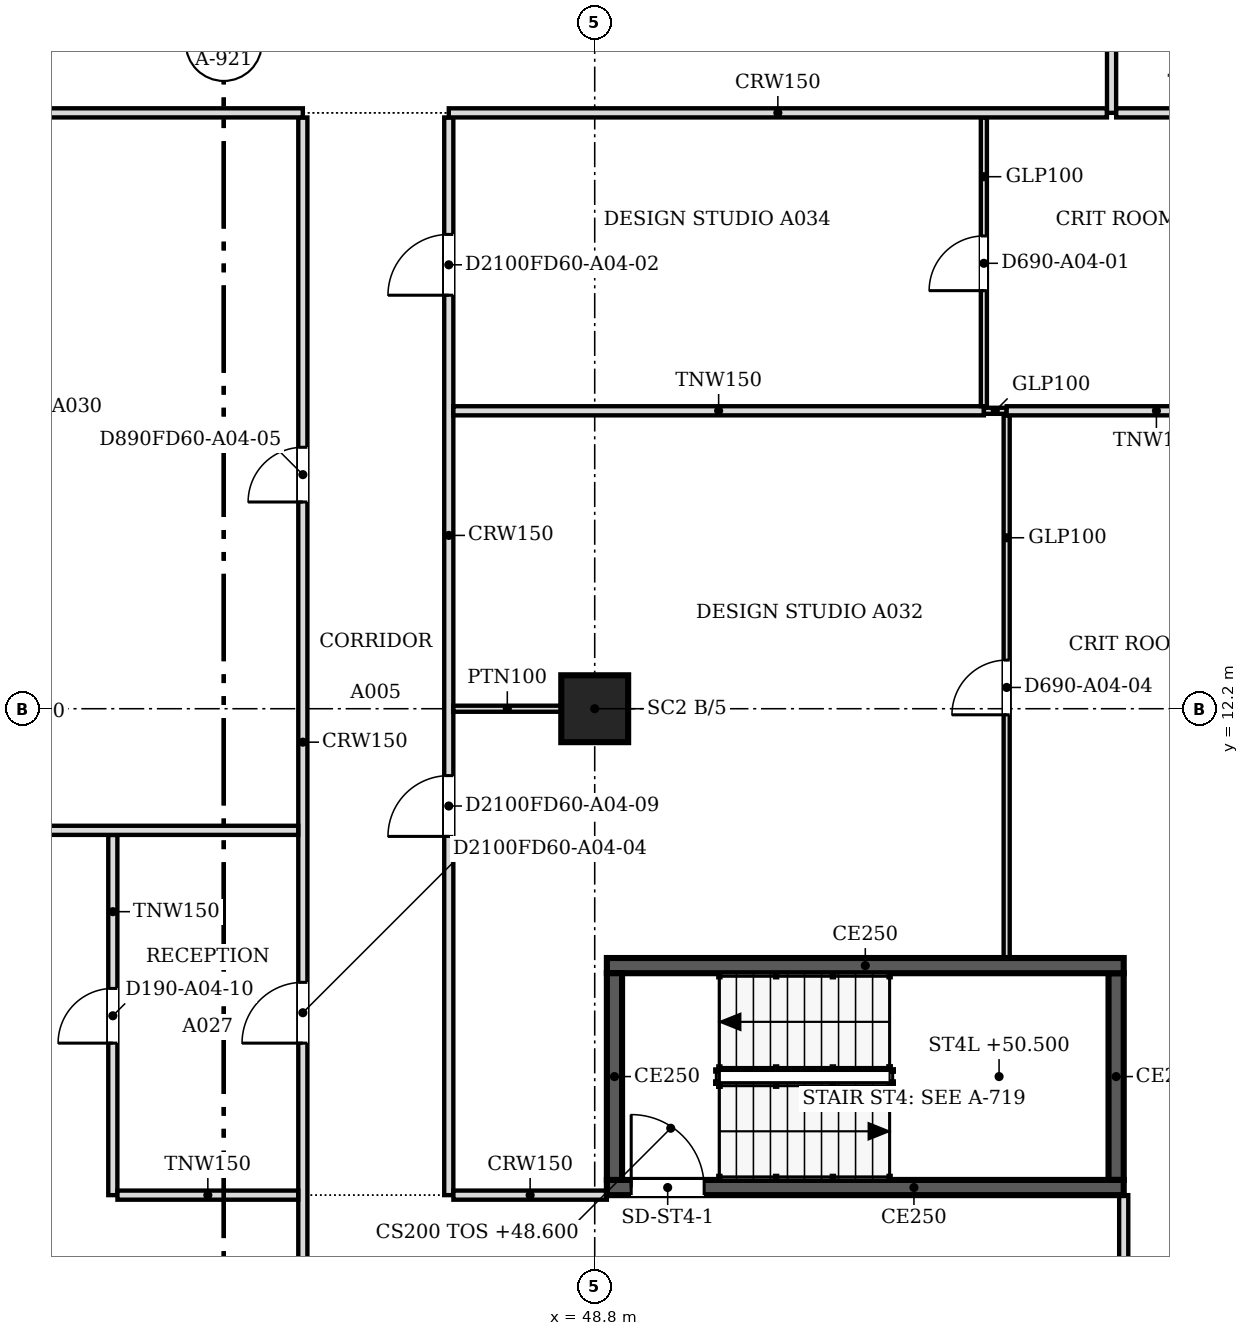
"""IFC4 building model, lengths in metres.
Left out: names, types, materials, properties, quantities, classifications, styles, units other than length and angle.
Written with IfcOpenShell. Run it as: python <this file> out.ifc"""

import sys

from ifc_helpers import new_model, si_unit, direction, frame, frame_2d, origin, origin_2d, place, context, subcontext, project, spatial, polyline, rectangle, outline, extrude, faceted_brep, source, transform, mapped, element, fill, save


model = new_model("IFC4")
c1 = context("Model", 3, precision=1e-05, world=origin(), true_north=direction((0.0, 1.0)))
c2 = subcontext(c1, "Body", "Model", "MODEL_VIEW")
j1 = project(units=[si_unit("LENGTHUNIT", "METRE"), si_unit("PLANEANGLEUNIT", "RADIAN")], contexts=[c1])
p1 = place(None, origin())
s1 = spatial("IfcSite", under=j1, at=p1, CompositionType="ELEMENT")
p2 = place(p1, origin())
s2 = spatial("IfcBuilding", under=s1, at=p2, CompositionType="ELEMENT")
p3 = place(p2, frame((0.0, 0.0, 48.6)))
s3 = spatial("IfcBuildingStorey", under=s2, at=p3, CompositionType="ELEMENT", Elevation=48.6)
p4 = place(p3, frame((48.8, 12.2, 0.0), z_axis=(0.0, 0.0, 1.0), x_axis=(1.0, 0.0, 0.0)))
e1 = element("IfcColumn", 1, at=p4, inside=s3, PredefinedType="COLUMN", context=c2, shape_type="SweptSolid", body=[
    extrude(rectangle(XDim=1.1, YDim=1.1, at=origin_2d()), origin(), (0.0, 0.0, 1.0), 3.6),
])
m1 = source(origin(), c2, "Body", "Brep", [
    faceted_brep([(2.944, -0.25, 0.0), (2.997, -0.25, 0.068), (2.997, -0.25, 7.532), (2.944, -0.25, 7.6), (0.0, -0.25, 3.8), (0.053, 0.25, 3.868), (2.891, 0.25, 7.532), (2.891, 0.25, 0.068), (0.053, 0.25, 3.732), (2.944, 0.0, 0.0), (2.944, 0.0, 7.6), (0.0, 0.0, 3.8)], [[[0, 1, 2, 3, 4]], [[5, 6, 7, 8]], [[1, 0, 9]], [[10, 3, 2]], [[6, 5, 11, 4, 3, 10]], [[8, 7, 9, 0, 4, 11]], [[8, 11, 5]], [[1, 9, 7, 6, 10, 2]]]),
])
p5 = place(p3, frame((57.606, 1.312, -3.8), z_axis=(0.0, 0.0, 1.0), x_axis=(0.707147509625, 0.707066050402, 0.0)))
e2 = element("IfcWall", 2, at=p5, inside=s3, PredefinedType="SOLIDWALL", context=c2, shape_type="MappedRepresentation", body=[
    mapped(m1, transform((0.0, 0.0, 0.0), scale=1.0)),
])
m2 = source(origin(), c2, "Body", "SweptSolid", [
    extrude(outline(polyline([(2.744, 6.934), (0.316, 3.8), (2.744, 0.666), (2.744, 6.934)])), frame((0.0, 0.26, 0.0), z_axis=(0.0, -1.0, 0.0), x_axis=(1.0, 0.0, 0.0)), (0.0, 0.0, 1.0), 0.52),
])
p6 = place(p5, origin())
e3 = element("IfcOpeningElement", 3, at=p6, cuts=e2, PredefinedType="OPENING", context=c2, shape_type="MappedRepresentation", body=[
    mapped(m2, transform((0.0, 0.0, 0.0), scale=1.0)),
])
p7 = place(p2, frame((0.0, 0.0, 52.4)))
s4 = spatial("IfcBuildingStorey", under=s2, at=p7, CompositionType="ELEMENT", Elevation=52.4)
m3 = source(origin(), c2, "Body", "Brep", [
    faceted_brep([(0.053, -0.25, 0.0), (2.997, -0.25, 3.8), (0.053, -0.25, 7.6), (0.0, -0.25, 7.532), (0.0, -0.25, 0.068), (0.106, 0.25, 7.531), (2.944, 0.25, 3.868), (2.944, 0.25, 3.732), (0.106, 0.25, 0.068), (2.997, 0.0, 3.8), (0.053, 0.0, 0.0), (0.053, 0.0, 7.6)], [[[0, 1, 2, 3, 4]], [[5, 6, 7, 8]], [[8, 7, 9, 1, 0, 10]], [[6, 5, 11, 2, 1, 9]], [[3, 2, 11]], [[10, 0, 4]], [[8, 10, 4, 3, 11, 5]], [[9, 7, 6]]]),
])
p8 = place(p7, frame((57.569, 1.274, -3.8), z_axis=(0.0, 0.0, 1.0), x_axis=(0.707066050402, 0.707147509625, 0.0)))
e4 = element("IfcWall", 4, at=p8, inside=s4, PredefinedType="SOLIDWALL", context=c2, shape_type="MappedRepresentation", body=[
    mapped(m3, transform((0.0, 0.0, 0.0), scale=1.0)),
])
m4 = source(origin(), c2, "Body", "SweptSolid", [
    extrude(outline(polyline([(0.253, 0.666), (2.681, 3.8), (0.253, 6.934), (0.253, 0.666)])), frame((0.0, 0.26, 0.0), z_axis=(0.0, -1.0, 0.0), x_axis=(1.0, 0.0, 0.0)), (0.0, 0.0, 1.0), 0.52),
])
p9 = place(p8, origin())
e5 = element("IfcOpeningElement", 5, at=p9, cuts=e4, PredefinedType="OPENING", context=c2, shape_type="MappedRepresentation", body=[
    mapped(m4, transform((0.0, 0.0, 0.0), scale=1.0)),
])
p10 = place(p3, frame((57.5, 4.325, 0.0), z_axis=(0.0, 0.0, 1.0), x_axis=(-1.0, 0.0, 0.0)))
e6 = element("IfcWall", 6, at=p10, inside=s3, PredefinedType="SOLIDWALL", context=c2, shape_type="SweptSolid", body=[
    extrude(rectangle(XDim=8.5, YDim=0.25, at=frame_2d((4.25, 0.0))), origin(), (0.0, 0.0, 1.0), 3.8),
])
m5 = source(origin(), c2, "Body", "SweptSolid", [
    extrude(rectangle(XDim=1.2, YDim=2.1, at=frame_2d((0.6, 1.05))), frame((0.0, 0.135, 0.0), z_axis=(0.0, -1.0, 0.0), x_axis=(1.0, 0.0, 0.0)), (0.0, 0.0, 1.0), 0.27),
])
p11 = place(p10, frame((6.9, 0.0, 0.0)))
e7 = element("IfcOpeningElement", 7, at=p11, cuts=e6, PredefinedType="OPENING", context=c2, shape_type="MappedRepresentation", body=[
    mapped(m5, transform((0.0, 0.0, 0.0), scale=1.0)),
])
p12 = place(p3, frame((49.125, 4.45, 0.0), z_axis=(0.0, 0.0, 1.0), x_axis=(0.0, 1.0, 0.0)))
e8 = element("IfcWall", 8, at=p12, inside=s3, PredefinedType="SOLIDWALL", context=c2, shape_type="SweptSolid", body=[
    extrude(rectangle(XDim=3.4, YDim=0.25, at=frame_2d((1.7, 0.0))), origin(), (0.0, 0.0, 1.0), 3.8),
])
p13 = place(p3, frame((49.0, 7.975, 0.0), z_axis=(0.0, 0.0, 1.0), x_axis=(1.0, 0.0, 0.0)))
e9 = element("IfcWall", 9, at=p13, inside=s3, PredefinedType="SOLIDWALL", context=c2, shape_type="SweptSolid", body=[
    extrude(rectangle(XDim=8.5, YDim=0.25, at=frame_2d((4.25, 0.0))), origin(), (0.0, 0.0, 1.0), 3.8),
])
p14 = place(p3, frame((57.375, 7.85, 0.0), z_axis=(0.0, 0.0, 1.0), x_axis=(0.0, -1.0, 0.0)))
e10 = element("IfcWall", 10, at=p14, inside=s3, PredefinedType="SOLIDWALL", context=c2, shape_type="SweptSolid", body=[
    extrude(rectangle(XDim=3.4, YDim=0.25, at=frame_2d((1.7, 0.0))), origin(), (0.0, 0.0, 1.0), 3.8),
])
p15 = place(p3, frame((44.0, 0.5, 0.0), z_axis=(0.0, 0.0, 1.0), x_axis=(0.0, 1.0, 0.0)))
e11 = element("IfcWall", 11, at=p15, inside=s3, PredefinedType="PARTITIONING", context=c2, shape_type="SweptSolid", body=[
    extrude(rectangle(XDim=21.424, YDim=0.15, at=frame_2d((10.712, 0.0))), origin(), (0.0, 0.0, 1.0), 3.067),
])
m6 = source(origin(), c2, "Body", "SweptSolid", [
    extrude(rectangle(XDim=1.0, YDim=2.1, at=frame_2d((0.5, 1.05))), frame((0.0, 0.085, 0.0), z_axis=(0.0, -1.0, 0.0), x_axis=(1.0, 0.0, 0.0)), (0.0, 0.0, 1.0), 0.17),
])
p16 = place(p15, frame((6.2, 0.0, 0.0)))
e12 = element("IfcOpeningElement", 12, at=p16, cuts=e11, PredefinedType="OPENING", context=c2, shape_type="MappedRepresentation", body=[
    mapped(m6, transform((0.0, 0.0, 0.0), scale=1.0)),
])
m7 = source(origin(), c2, "Body", "SweptSolid", [
    extrude(rectangle(XDim=0.9, YDim=2.1, at=frame_2d((0.45, 1.05))), frame((0.0, 0.085, 0.0), z_axis=(0.0, -1.0, 0.0), x_axis=(1.0, 0.0, 0.0)), (0.0, 0.0, 1.0), 0.17),
])
p17 = place(p15, frame((15.1, 0.0, 0.0)))
e13 = element("IfcOpeningElement", 13, at=p17, cuts=e11, PredefinedType="OPENING", context=c2, shape_type="MappedRepresentation", body=[
    mapped(m7, transform((0.0, 0.0, 0.0), scale=1.0)),
])
p18 = place(p3, frame((57.5, 1.559, 0.0), z_axis=(0.0, 0.0, 1.0), x_axis=(0.0, 1.0, 0.0)))
e14 = element("IfcWall", 14, at=p18, inside=s3, PredefinedType="PARTITIONING", context=c2, shape_type="SweptSolid", body=[
    extrude(rectangle(XDim=2.641, YDim=0.15, at=frame_2d((1.32, 0.0))), origin(), (0.0, 0.0, 1.0), 3.067),
])
p19 = place(p3, frame((40.875, 4.2, 0.0), z_axis=(0.0, 0.0, 1.0), x_axis=(0.0, 1.0, 0.0)))
e15 = element("IfcWall", 15, at=p19, inside=s3, PredefinedType="PARTITIONING", context=c2, shape_type="SweptSolid", body=[
    extrude(rectangle(XDim=5.924, YDim=0.15, at=frame_2d((2.962, 0.0))), origin(), (0.0, 0.0, 1.0), 3.067),
])
p20 = place(p19, frame((2.5, 0.0, 0.0)))
e16 = element("IfcOpeningElement", 16, at=p20, cuts=e15, PredefinedType="OPENING", context=c2, shape_type="MappedRepresentation", body=[
    mapped(m7, transform((0.0, 0.0, 0.0), scale=1.0)),
])
p21 = place(p3, frame((40.951, 4.2, 0.0), z_axis=(0.0, 0.0, 1.0), x_axis=(1.0, 0.0, 0.0)))
e17 = element("IfcWall", 17, at=p21, inside=s3, PredefinedType="PARTITIONING", context=c2, shape_type="SweptSolid", body=[
    extrude(rectangle(XDim=2.973, YDim=0.15, at=frame_2d((1.487, 0.0))), origin(), (0.0, 0.0, 1.0), 3.067),
])
p22 = place(p3, frame((46.4, 21.924, 0.0), z_axis=(0.0, 0.0, 1.0), x_axis=(0.0, -1.0, 0.0)))
e18 = element("IfcWall", 18, at=p22, inside=s3, PredefinedType="PARTITIONING", context=c2, shape_type="SweptSolid", body=[
    extrude(rectangle(XDim=17.724, YDim=0.15, at=frame_2d((8.862, 0.0))), origin(), (0.0, 0.0, 1.0), 3.067),
])
p23 = place(p22, frame((1.923, 0.0, 0.0)))
e19 = element("IfcOpeningElement", 19, at=p23, cuts=e18, PredefinedType="OPENING", context=c2, shape_type="MappedRepresentation", body=[
    mapped(m6, transform((0.0, 0.0, 0.0), scale=1.0)),
])
p24 = place(p22, frame((10.824, 0.0, 0.0)))
e20 = element("IfcOpeningElement", 20, at=p24, cuts=e18, PredefinedType="OPENING", context=c2, shape_type="MappedRepresentation", body=[
    mapped(m6, transform((0.0, 0.0, 0.0), scale=1.0)),
])
p25 = place(p3, frame((46.476, 4.2, 0.0), z_axis=(0.0, 0.0, 1.0), x_axis=(1.0, 0.0, 0.0)))
e21 = element("IfcWall", 21, at=p25, inside=s3, PredefinedType="PARTITIONING", context=c2, shape_type="SweptSolid", body=[
    extrude(rectangle(XDim=2.524, YDim=0.15, at=frame_2d((1.262, 0.0))), origin(), (0.0, 0.0, 1.0), 3.067),
])
p26 = place(p3, frame((55.575, 17.024, 0.0), z_axis=(0.0, 0.0, 1.0), x_axis=(0.0, -1.0, 0.0)))
e22 = element("IfcWall", 22, at=p26, inside=s3, PredefinedType="PARTITIONING", context=c2, shape_type="SweptSolid", body=[
    extrude(rectangle(XDim=8.924, YDim=0.1, at=frame_2d((4.462, 0.0))), origin(), (0.0, 0.0, 1.0), 3.067),
])
m8 = source(origin(), c2, "Body", "SweptSolid", [
    extrude(rectangle(XDim=0.9, YDim=2.1, at=frame_2d((0.45, 1.05))), frame((0.0, 0.06, 0.0), z_axis=(0.0, -1.0, 0.0), x_axis=(1.0, 0.0, 0.0)), (0.0, 0.0, 1.0), 0.12),
])
p27 = place(p26, frame((4.024, 0.0, 0.0)))
e23 = element("IfcOpeningElement", 23, at=p27, cuts=e22, PredefinedType="OPENING", context=c2, shape_type="MappedRepresentation", body=[
    mapped(m8, transform((0.0, 0.0, 0.0), scale=1.0)),
])
p28 = place(p3, frame((27.5, 10.2, 0.0), z_axis=(0.0, 0.0, 1.0), x_axis=(1.0, 0.0, 0.0)))
e24 = element("IfcWall", 24, at=p28, inside=s3, PredefinedType="PARTITIONING", context=c2, shape_type="SweptSolid", body=[
    extrude(rectangle(XDim=16.424, YDim=0.15, at=frame_2d((8.212, 0.0))), origin(), (0.0, 0.0, 1.0), 3.067),
])
p29 = place(p3, frame((48.25, 12.2, 0.0), z_axis=(0.0, 0.0, 1.0), x_axis=(-1.0, 0.0, 0.0)))
e25 = element("IfcWall", 25, at=p29, inside=s3, PredefinedType="PARTITIONING", context=c2, shape_type="SweptSolid", body=[
    extrude(rectangle(XDim=1.775, YDim=0.1, at=frame_2d((0.887, 0.0))), origin(), (0.0, 0.0, 1.0), 3.067),
])
p30 = place(p3, frame((46.476, 17.1, 0.0), z_axis=(0.0, 0.0, 1.0), x_axis=(1.0, 0.0, 0.0)))
e26 = element("IfcWall", 26, at=p30, inside=s3, PredefinedType="PARTITIONING", context=c2, shape_type="SweptSolid", body=[
    extrude(rectangle(XDim=8.724, YDim=0.15, at=frame_2d((4.362, 0.0))), origin(), (0.0, 0.0, 1.0), 3.067),
])
p31 = place(p3, frame((55.201, 17.1, 0.0), z_axis=(0.0, 0.0, 1.0), x_axis=(1.0, 0.0, 0.0)))
e27 = element("IfcWall", 27, at=p31, inside=s3, PredefinedType="PARTITIONING", context=c2, shape_type="SweptSolid", body=[
    extrude(rectangle(XDim=0.373, YDim=0.1, at=frame_2d((0.187, 0.0))), origin(), (0.0, 0.0, 1.0), 3.067),
])
p32 = place(p3, frame((55.575, 17.1, 0.0), z_axis=(0.0, 0.0, 1.0), x_axis=(1.0, 0.0, 0.0)))
e28 = element("IfcWall", 28, at=p32, inside=s3, PredefinedType="PARTITIONING", context=c2, shape_type="SweptSolid", body=[
    extrude(rectangle(XDim=4.925, YDim=0.15, at=frame_2d((2.462, 0.0))), origin(), (0.0, 0.0, 1.0), 3.067),
])
p33 = place(p3, frame((55.2, 21.924, 0.0), z_axis=(0.0, 0.0, 1.0), x_axis=(0.0, -1.0, 0.0)))
e29 = element("IfcWall", 29, at=p33, inside=s3, PredefinedType="PARTITIONING", context=c2, shape_type="SweptSolid", body=[
    extrude(rectangle(XDim=4.748, YDim=0.1, at=frame_2d((2.374, 0.0))), origin(), (0.0, 0.0, 1.0), 3.067),
])
p34 = place(p33, frame((1.948, 0.0, 0.0)))
e30 = element("IfcOpeningElement", 30, at=p34, cuts=e29, PredefinedType="OPENING", context=c2, shape_type="MappedRepresentation", body=[
    mapped(m8, transform((0.0, 0.0, 0.0), scale=1.0)),
])
p35 = place(p3, frame((30.5, 22.0, 0.0), z_axis=(0.0, 0.0, 1.0), x_axis=(1.0, 0.0, 0.0)))
e31 = element("IfcWall", 31, at=p35, inside=s3, PredefinedType="PARTITIONING", context=c2, shape_type="SweptSolid", body=[
    extrude(rectangle(XDim=13.5, YDim=0.15, at=frame_2d((6.75, 0.0))), origin(), (0.0, 0.0, 1.0), 3.067),
])
p36 = place(p3, frame((46.4, 22.0, 0.0), z_axis=(0.0, 0.0, 1.0), x_axis=(1.0, 0.0, 0.0)))
e32 = element("IfcWall", 32, at=p36, inside=s3, PredefinedType="PARTITIONING", context=c2, shape_type="SweptSolid", body=[
    extrude(rectangle(XDim=10.824, YDim=0.15, at=frame_2d((5.412, 0.0))), origin(), (0.0, 0.0, 1.0), 3.067),
])
p37 = place(p3, frame((57.3, 30.6, 0.0), z_axis=(0.0, 0.0, 1.0), x_axis=(0.0, -1.0, 0.0)))
e33 = element("IfcWall", 33, at=p37, inside=s3, PredefinedType="PARTITIONING", context=c2, shape_type="SweptSolid", body=[
    extrude(rectangle(XDim=8.6, YDim=0.15, at=frame_2d((4.3, 0.0))), origin(), (0.0, 0.0, 1.0), 3.067),
])
p38 = place(p37, frame((3.9, 0.0, 0.0)))
e34 = element("IfcOpeningElement", 34, at=p38, cuts=e33, PredefinedType="OPENING", context=c2, shape_type="MappedRepresentation", body=[
    mapped(m7, transform((0.0, 0.0, 0.0), scale=1.0)),
])
p39 = place(p3, frame((57.376, 22.0, 0.0), z_axis=(0.0, 0.0, 1.0), x_axis=(1.0, 0.0, 0.0)))
e35 = element("IfcWall", 35, at=p39, inside=s3, PredefinedType="PARTITIONING", context=c2, shape_type="SweptSolid", body=[
    extrude(rectangle(XDim=3.124, YDim=0.15, at=frame_2d((1.562, 0.0))), origin(), (0.0, 0.0, 1.0), 3.067),
])
m9 = source(origin(), c2, "Body", "SweptSolid", [
    extrude(rectangle(XDim=1.2, YDim=2.1, at=frame_2d((0.6, 1.05))), frame((0.0, 0.025, 0.0), z_axis=(0.0, -1.0, 0.0), x_axis=(1.0, 0.0, 0.0)), (0.0, 0.0, 1.0), 0.05),
])
p40 = place(p11, origin())
e36 = element("IfcDoor", 36, at=p40, inside=s3, OperationType="SINGLE_SWING_RIGHT", PredefinedType="DOOR", context=c2, shape_type="MappedRepresentation", body=[
    mapped(m9, transform((0.0, 0.0, 0.0), scale=1.0)),
])
fill(e7, e36)
m10 = source(origin(), c2, "Body", "SweptSolid", [
    extrude(rectangle(XDim=0.9, YDim=2.1, at=frame_2d((0.45, 1.05))), frame((0.0, 0.025, 0.0), z_axis=(0.0, -1.0, 0.0), x_axis=(1.0, 0.0, 0.0)), (0.0, 0.0, 1.0), 0.05),
])
p41 = place(p34, origin())
e37 = element("IfcDoor", 37, at=p41, inside=s3, OperationType="SINGLE_SWING_RIGHT", PredefinedType="DOOR", context=c2, shape_type="MappedRepresentation", body=[
    mapped(m10, transform((0.0, 0.0, 0.0), scale=1.0)),
])
fill(e30, e37)
m11 = source(origin(), c2, "Body", "SweptSolid", [
    extrude(rectangle(XDim=1.0, YDim=2.1, at=frame_2d((0.5, 1.05))), frame((0.0, 0.025, 0.0), z_axis=(0.0, -1.0, 0.0), x_axis=(1.0, 0.0, 0.0)), (0.0, 0.0, 1.0), 0.05),
])
p42 = place(p23, origin())
e38 = element("IfcDoor", 38, at=p42, inside=s3, OperationType="SINGLE_SWING_RIGHT", PredefinedType="DOOR", context=c2, shape_type="MappedRepresentation", body=[
    mapped(m11, transform((0.0, 0.0, 0.0), scale=1.0)),
])
fill(e19, e38)
p43 = place(p16, origin())
e39 = element("IfcDoor", 39, at=p43, inside=s3, OperationType="SINGLE_SWING_LEFT", PredefinedType="DOOR", context=c2, shape_type="MappedRepresentation", body=[
    mapped(m11, transform((0.0, 0.0, 0.0), scale=1.0)),
])
fill(e12, e39)
p44 = place(p20, origin())
e40 = element("IfcDoor", 40, at=p44, inside=s3, OperationType="SINGLE_SWING_LEFT", PredefinedType="DOOR", context=c2, shape_type="MappedRepresentation", body=[
    mapped(m10, transform((0.0, 0.0, 0.0), scale=1.0)),
])
fill(e16, e40)
p45 = place(p27, origin())
e41 = element("IfcDoor", 41, at=p45, inside=s3, OperationType="SINGLE_SWING_RIGHT", PredefinedType="DOOR", context=c2, shape_type="MappedRepresentation", body=[
    mapped(m10, transform((0.0, 0.0, 0.0), scale=1.0)),
])
fill(e23, e41)
p46 = place(p17, origin())
e42 = element("IfcDoor", 42, at=p46, inside=s3, OperationType="SINGLE_SWING_LEFT", PredefinedType="DOOR", context=c2, shape_type="MappedRepresentation", body=[
    mapped(m10, transform((0.0, 0.0, 0.0), scale=1.0)),
])
fill(e13, e42)
p47 = place(p24, origin())
e43 = element("IfcDoor", 43, at=p47, inside=s3, OperationType="SINGLE_SWING_RIGHT", PredefinedType="DOOR", context=c2, shape_type="MappedRepresentation", body=[
    mapped(m11, transform((0.0, 0.0, 0.0), scale=1.0)),
])
fill(e20, e43)
save(model, sys.argv[1])
